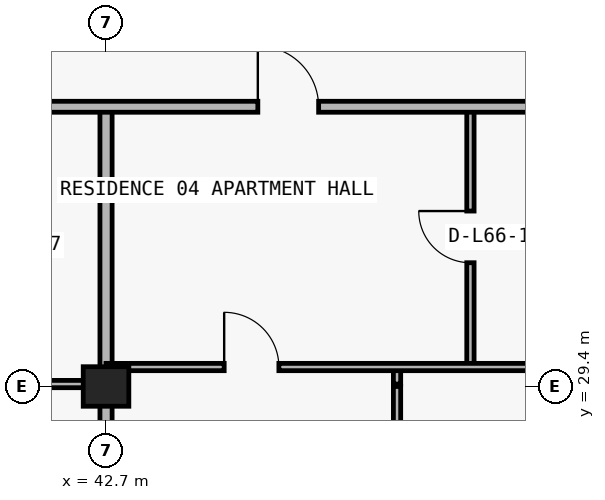
"""IFC4 building model, lengths in metres.
Left out: names, types, materials, properties, quantities, classifications, styles, units other than length and angle.
Written with IfcOpenShell. Run it as: python <this file> out.ifc"""

import sys

from ifc_helpers import new_model, si_unit, direction, frame, frame_2d, origin, origin_2d, place, context, subcontext, project, spatial, rectangle, extrude, element, fill, save


model = new_model("IFC4")
c1 = context("Model", 3, precision=1e-05, world=origin(), true_north=direction((0.0, 1.0)))
c2 = subcontext(c1, "Body", "Model", "MODEL_VIEW")
j1 = project(units=[si_unit("LENGTHUNIT", "METRE"), si_unit("PLANEANGLEUNIT", "RADIAN")], contexts=[c1])
p1 = place(None, origin())
s1 = spatial("IfcSite", under=j1, at=p1, CompositionType="ELEMENT")
p2 = place(p1, origin())
s2 = spatial("IfcBuilding", under=s1, at=p2, CompositionType="ELEMENT")
p3 = place(p2, frame((0.0, 0.0, 236.4)))
s3 = spatial("IfcBuildingStorey", under=s2, at=p3, CompositionType="ELEMENT", Elevation=236.4)
p4 = place(p3, frame((42.7, 29.4, 0.0), z_axis=(0.0, 0.0, 1.0), x_axis=(1.0, 0.0, 0.0)))
e1 = element("IfcColumn", 1, at=p4, inside=s3, PredefinedType="COLUMN", context=c2, shape_type="SweptSolid", body=[
    extrude(rectangle(XDim=0.75, YDim=0.65, at=origin_2d()), origin(), (0.0, 0.0, 1.0), 3.05),
])
p5 = place(p3, frame((42.7, 13.34, 0.0), z_axis=(0.0, 0.0, 1.0), x_axis=(0.0, 1.0, 0.0)))
e2 = element("IfcWall", 2, at=p5, inside=s3, PredefinedType="PARTITIONING", context=c2, shape_type="SweptSolid", body=[
    extrude(rectangle(XDim=16.06, YDim=0.2, at=frame_2d((8.03, 0.0))), origin(), (0.0, 0.0, 1.0), 2.263),
])
p6 = place(p3, frame((42.7, 29.44, 0.0), z_axis=(0.0, 0.0, 1.0), x_axis=(0.0, 1.0, 0.0)))
e3 = element("IfcWall", 3, at=p6, inside=s3, PredefinedType="PARTITIONING", context=c2, shape_type="SweptSolid", body=[
    extrude(rectangle(XDim=4.56, YDim=0.2, at=frame_2d((2.28, 0.0))), origin(), (0.0, 0.0, 1.0), 2.263),
])
p7 = place(p3, frame((47.486, 24.575, 0.0), z_axis=(0.0, 0.0, 1.0), x_axis=(0.0, 1.0, 0.0)))
e4 = element("IfcWall", 4, at=p7, inside=s3, PredefinedType="PARTITIONING", context=c2, shape_type="SweptSolid", body=[
    extrude(rectangle(XDim=4.825, YDim=0.12, at=frame_2d((2.413, 0.0))), origin(), (0.0, 0.0, 1.0), 3.05),
])
p8 = place(p7, frame((1.962, 0.0, 0.0)))
e5 = element("IfcOpeningElement", 5, at=p8, cuts=e4, PredefinedType="OPENING", context=c2, shape_type="SweptSolid", body=[
    extrude(rectangle(XDim=0.9, YDim=2.15, at=frame_2d((0.45, 1.075))), frame((0.0, 0.07, 0.0), z_axis=(0.0, -1.0, 0.0), x_axis=(1.0, 0.0, 0.0)), (0.0, 0.0, 1.0), 0.14),
])
p9 = place(p3, frame((47.486, 29.44, 0.0), z_axis=(0.0, 0.0, 1.0), x_axis=(0.0, 1.0, 0.0)))
e6 = element("IfcWall", 6, at=p9, inside=s3, PredefinedType="PARTITIONING", context=c2, shape_type="SweptSolid", body=[
    extrude(rectangle(XDim=0.28, YDim=0.12, at=frame_2d((0.14, 0.0))), origin(), (0.0, 0.0, 1.0), 3.05),
])
p10 = place(p3, frame((48.693, 29.72, 0.0), z_axis=(0.0, 0.0, 1.0), x_axis=(0.0, 1.0, 0.0)))
e7 = element("IfcWall", 7, at=p10, inside=s3, PredefinedType="PARTITIONING", context=c2, shape_type="SweptSolid", body=[
    extrude(rectangle(XDim=4.28, YDim=0.12, at=frame_2d((2.14, 0.0))), origin(), (0.0, 0.0, 1.0), 3.05),
])
p11 = place(p10, frame((1.715, 0.0, 0.0)))
e8 = element("IfcOpeningElement", 8, at=p11, cuts=e7, PredefinedType="OPENING", context=c2, shape_type="SweptSolid", body=[
    extrude(rectangle(XDim=0.85, YDim=2.1, at=frame_2d((0.425, 1.05))), frame((0.0, 0.07, 0.0), z_axis=(0.0, -1.0, 0.0), x_axis=(1.0, 0.0, 0.0)), (0.0, 0.0, 1.0), 0.14),
])
p12 = place(p3, frame((35.1, 29.44, 0.0), z_axis=(0.0, 0.0, 1.0), x_axis=(1.0, 0.0, 0.0)))
e9 = element("IfcWall", 9, at=p12, inside=s3, PredefinedType="PARTITIONING", context=c2, shape_type="SweptSolid", body=[
    extrude(rectangle(XDim=7.6, YDim=0.12, at=frame_2d((3.8, 0.0))), origin(), (0.0, 0.0, 1.0), 2.263),
])
p13 = place(p12, frame((1.602, 0.0, 0.0)))
e10 = element("IfcOpeningElement", 10, at=p13, cuts=e9, PredefinedType="OPENING", context=c2, shape_type="SweptSolid", body=[
    extrude(rectangle(XDim=0.9, YDim=2.15, at=frame_2d((0.45, 1.075))), frame((0.0, 0.07, 0.0), z_axis=(0.0, -1.0, 0.0), x_axis=(1.0, 0.0, 0.0)), (0.0, 0.0, 1.0), 0.14),
])
p14 = place(p3, frame((42.7, 29.72, 0.0), z_axis=(0.0, 0.0, 1.0), x_axis=(1.0, 0.0, 0.0)))
e11 = element("IfcWall", 11, at=p14, inside=s3, PredefinedType="PARTITIONING", context=c2, shape_type="SweptSolid", body=[
    extrude(rectangle(XDim=8.4, YDim=0.12, at=frame_2d((4.2, 0.0))), origin(), (0.0, 0.0, 1.0), 2.263),
])
p15 = place(p14, frame((1.943, 0.0, 0.0)))
e12 = element("IfcOpeningElement", 12, at=p15, cuts=e11, PredefinedType="OPENING", context=c2, shape_type="SweptSolid", body=[
    extrude(rectangle(XDim=0.9, YDim=2.15, at=frame_2d((0.45, 1.075))), frame((0.0, 0.07, 0.0), z_axis=(0.0, -1.0, 0.0), x_axis=(1.0, 0.0, 0.0)), (0.0, 0.0, 1.0), 0.14),
])
p16 = place(p3, frame((12.105, 34.0, 0.0), z_axis=(0.0, 0.0, 1.0), x_axis=(1.0, 0.0, 0.0)))
e13 = element("IfcWall", 13, at=p16, inside=s3, PredefinedType="PARTITIONING", context=c2, shape_type="SweptSolid", body=[
    extrude(rectangle(XDim=53.595, YDim=0.18, at=frame_2d((26.797, 0.0))), origin(), (0.0, 0.0, 1.0), 3.05),
])
p17 = place(p16, frame((1.607, 0.0, 0.0)))
e14 = element("IfcOpeningElement", 14, at=p17, cuts=e13, PredefinedType="OPENING", context=c2, shape_type="SweptSolid", body=[
    extrude(rectangle(XDim=1.0, YDim=2.2, at=frame_2d((0.5, 1.1))), frame((0.0, 0.1, 0.0), z_axis=(0.0, -1.0, 0.0), x_axis=(1.0, 0.0, 0.0)), (0.0, 0.0, 1.0), 0.2),
])
p18 = place(p16, frame((17.057, 0.0, 0.0)))
e15 = element("IfcOpeningElement", 15, at=p18, cuts=e13, PredefinedType="OPENING", context=c2, shape_type="SweptSolid", body=[
    extrude(rectangle(XDim=1.0, YDim=2.2, at=frame_2d((0.5, 1.1))), frame((0.0, 0.1, 0.0), z_axis=(0.0, -1.0, 0.0), x_axis=(1.0, 0.0, 0.0)), (0.0, 0.0, 1.0), 0.2),
])
p19 = place(p16, frame((25.242, 0.0, 0.0)))
e16 = element("IfcOpeningElement", 16, at=p19, cuts=e13, PredefinedType="OPENING", context=c2, shape_type="SweptSolid", body=[
    extrude(rectangle(XDim=1.0, YDim=2.2, at=frame_2d((0.5, 1.1))), frame((0.0, 0.1, 0.0), z_axis=(0.0, -1.0, 0.0), x_axis=(1.0, 0.0, 0.0)), (0.0, 0.0, 1.0), 0.2),
])
p20 = place(p16, frame((33.092, 0.0, 0.0)))
e17 = element("IfcOpeningElement", 17, at=p20, cuts=e13, PredefinedType="OPENING", context=c2, shape_type="SweptSolid", body=[
    extrude(rectangle(XDim=1.0, YDim=2.2, at=frame_2d((0.5, 1.1))), frame((0.0, 0.1, 0.0), z_axis=(0.0, -1.0, 0.0), x_axis=(1.0, 0.0, 0.0)), (0.0, 0.0, 1.0), 0.2),
])
p21 = place(p16, frame((41.705, 0.0, 0.0)))
e18 = element("IfcOpeningElement", 18, at=p21, cuts=e13, PredefinedType="OPENING", context=c2, shape_type="SweptSolid", body=[
    extrude(rectangle(XDim=1.0, YDim=2.2, at=frame_2d((0.5, 1.1))), frame((0.0, 0.1, 0.0), z_axis=(0.0, -1.0, 0.0), x_axis=(1.0, 0.0, 0.0)), (0.0, 0.0, 1.0), 0.2),
])
p22 = place(p20, origin())
e19 = element("IfcDoor", 19, at=p22, inside=s3, OperationType="SINGLE_SWING_LEFT", PredefinedType="DOOR", context=c2, shape_type="SweptSolid", body=[
    extrude(rectangle(XDim=1.0, YDim=2.2, at=frame_2d((0.5, 1.1))), frame((0.0, 0.025, 0.0), z_axis=(0.0, -1.0, 0.0), x_axis=(1.0, 0.0, 0.0)), (0.0, 0.0, 1.0), 0.05),
])
fill(e17, e19)
p23 = place(p11, origin())
e20 = element("IfcDoor", 20, at=p23, inside=s3, OperationType="SINGLE_SWING_RIGHT", PredefinedType="DOOR", context=c2, shape_type="SweptSolid", body=[
    extrude(rectangle(XDim=0.85, YDim=2.1, at=frame_2d((0.425, 1.05))), frame((0.0, 0.025, 0.0), z_axis=(0.0, -1.0, 0.0), x_axis=(1.0, 0.0, 0.0)), (0.0, 0.0, 1.0), 0.05),
])
fill(e8, e20)
p24 = place(p15, origin())
e21 = element("IfcDoor", 21, at=p24, inside=s3, OperationType="SINGLE_SWING_LEFT", PredefinedType="DOOR", context=c2, shape_type="SweptSolid", body=[
    extrude(rectangle(XDim=0.9, YDim=2.15, at=frame_2d((0.45, 1.075))), frame((0.0, 0.025, 0.0), z_axis=(0.0, -1.0, 0.0), x_axis=(1.0, 0.0, 0.0)), (0.0, 0.0, 1.0), 0.05),
])
fill(e12, e21)
save(model, sys.argv[1])
